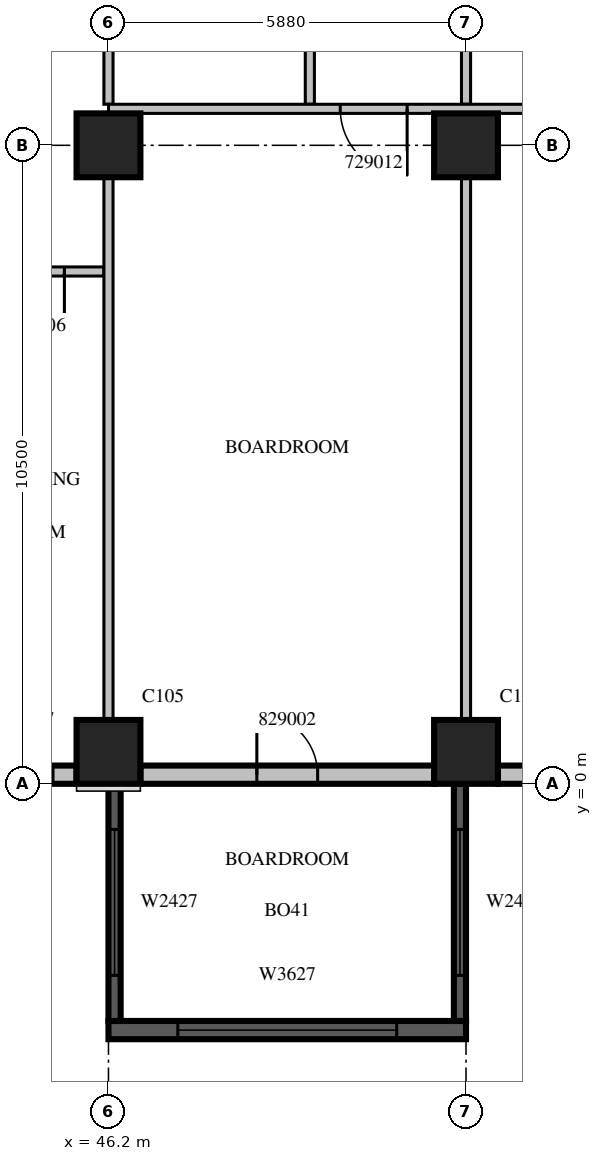
"""IFC4 building model, lengths in metres.
Left out: names, types, materials, properties, quantities, classifications, styles, units other than length and angle.
Written with IfcOpenShell. Run it as: python <this file> out.ifc"""

import sys

from ifc_helpers import new_model, si_unit, direction, frame, frame_2d, origin, origin_2d, place, context, subcontext, project, spatial, rectangle, extrude, source, transform, mapped, element, fill, save


model = new_model("IFC4")
c1 = context("Model", 3, precision=1e-05, world=origin(), true_north=direction((0.0, 1.0)))
c2 = subcontext(c1, "Body", "Model", "MODEL_VIEW")
j1 = project(units=[si_unit("LENGTHUNIT", "METRE"), si_unit("PLANEANGLEUNIT", "RADIAN")], contexts=[c1])
p1 = place(None, origin())
s1 = spatial("IfcSite", under=j1, at=p1, CompositionType="ELEMENT")
p2 = place(p1, origin())
s2 = spatial("IfcBuilding", under=s1, at=p2, CompositionType="ELEMENT")
p3 = place(p2, frame((0.0, 0.0, 132.9)))
s3 = spatial("IfcBuildingStorey", under=s2, at=p3, CompositionType="ELEMENT", Elevation=132.9)
m1 = source(origin(), c2, "Body", "SweptSolid", [
    extrude(rectangle(XDim=1.05, YDim=1.05, at=origin_2d()), origin(), (0.0, 0.0, 1.0), 4.2),
])
for number, where, z_axis, x_axis in (
    (1, (46.2, 0.525, 0.0), (0.0, 0.0, 1.0), (1.0, 0.0, 0.0)),
    (2, (52.08, 0.525, 0.0), (0.0, 0.0, 1.0), (1.0, 0.0, 0.0)),
    (3, (46.2, 10.5, 0.0), (0.0, 0.0, 1.0), (1.0, 0.0, 0.0)),
    (4, (52.08, 10.5, 0.0), (0.0, 0.0, 1.0), (1.0, 0.0, 0.0)),
):
    element("IfcColumn", number, at=place(p3, frame(where, z_axis=z_axis, x_axis=x_axis)), inside=s3, PredefinedType="COLUMN", context=c2, shape_type="MappedRepresentation", body=[
        mapped(m1, transform((0.0, 0.0, 0.0), scale=1.0)),
    ])
m2 = source(origin(), c2, "Body", "SweptSolid", [
    extrude(rectangle(XDim=1.675, YDim=0.3, at=frame_2d((0.838, 0.0))), origin(), (0.0, 0.0, 1.0), 3.8),
])
p4 = place(p3, frame((44.0, 0.15, 0.0), z_axis=(0.0, 0.0, 1.0), x_axis=(1.0, 0.0, 0.0)))
e5 = element("IfcWall", 5, at=p4, inside=s3, PredefinedType="STANDARD", context=c2, shape_type="MappedRepresentation", body=[
    mapped(m2, transform((0.0, 0.0, 0.0), scale=1.0)),
])
m3 = source(origin(), c2, "Body", "SweptSolid", [
    extrude(rectangle(XDim=0.9, YDim=2.7, at=frame_2d((0.45, 1.35))), frame((0.0, 0.16, 0.0), z_axis=(0.0, -1.0, 0.0), x_axis=(1.0, 0.0, 0.0)), (0.0, 0.0, 1.0), 0.32),
])
p5 = place(p4, frame((0.388, 0.0, 0.6)))
e6 = element("IfcOpeningElement", 6, at=p5, cuts=e5, PredefinedType="OPENING", context=c2, shape_type="MappedRepresentation", body=[
    mapped(m3, transform((0.0, 0.0, 0.0), scale=1.0)),
])
m4 = source(origin(), c2, "Body", "SweptSolid", [
    extrude(rectangle(XDim=4.83, YDim=0.3, at=frame_2d((2.415, 0.0))), origin(), (0.0, 0.0, 1.0), 3.8),
])
p6 = place(p3, frame((46.725, 0.15, 0.0), z_axis=(0.0, 0.0, 1.0), x_axis=(1.0, 0.0, 0.0)))
e7 = element("IfcWall", 7, at=p6, inside=s3, PredefinedType="STANDARD", context=c2, shape_type="MappedRepresentation", body=[
    mapped(m4, transform((0.0, 0.0, 0.0), scale=1.0)),
])
m5 = source(origin(), c2, "Body", "SweptSolid", [
    extrude(rectangle(XDim=1.0, YDim=2.1, at=frame_2d((0.5, 1.05))), frame((0.0, 0.16, 0.0), z_axis=(0.0, -1.0, 0.0), x_axis=(1.0, 0.0, 0.0)), (0.0, 0.0, 1.0), 0.32),
])
p7 = place(p6, frame((1.915, 0.0, 0.0)))
e8 = element("IfcOpeningElement", 8, at=p7, cuts=e7, PredefinedType="OPENING", context=c2, shape_type="MappedRepresentation", body=[
    mapped(m5, transform((0.0, 0.0, 0.0), scale=1.0)),
])
p8 = place(p3, frame((52.605, 0.15, 0.0), z_axis=(0.0, 0.0, 1.0), x_axis=(1.0, 0.0, 0.0)))
e9 = element("IfcWall", 9, at=p8, inside=s3, PredefinedType="STANDARD", context=c2, shape_type="MappedRepresentation", body=[
    mapped(m4, transform((0.0, 0.0, 0.0), scale=1.0)),
])
m6 = source(origin(), c2, "Body", "SweptSolid", [
    extrude(rectangle(XDim=3.6, YDim=2.7, at=frame_2d((1.8, 1.35))), frame((0.0, 0.16, 0.0), z_axis=(0.0, -1.0, 0.0), x_axis=(1.0, 0.0, 0.0)), (0.0, 0.0, 1.0), 0.32),
])
p9 = place(p8, frame((0.615, 0.0, 0.6)))
e10 = element("IfcOpeningElement", 10, at=p9, cuts=e9, PredefinedType="OPENING", context=c2, shape_type="MappedRepresentation", body=[
    mapped(m6, transform((0.0, 0.0, 0.0), scale=1.0)),
])
m7 = source(origin(), c2, "Body", "SweptSolid", [
    extrude(rectangle(XDim=5.88, YDim=0.3, at=frame_2d((2.94, 0.0))), origin(), (0.0, 0.0, 1.0), 3.79),
])
p10 = place(p3, frame((46.2, -4.05, 0.0), z_axis=(0.0, 0.0, 1.0), x_axis=(1.0, 0.0, 0.0)))
e11 = element("IfcWall", 11, at=p10, inside=s3, PredefinedType="SOLIDWALL", context=c2, shape_type="MappedRepresentation", body=[
    mapped(m7, transform((0.0, 0.0, 0.0), scale=1.0)),
])
p11 = place(p10, frame((1.14, 0.0, 0.6)))
e12 = element("IfcOpeningElement", 12, at=p11, cuts=e11, PredefinedType="OPENING", context=c2, shape_type="MappedRepresentation", body=[
    mapped(m6, transform((0.0, 0.0, 0.0), scale=1.0)),
])
m8 = source(origin(), c2, "Body", "SweptSolid", [
    extrude(rectangle(XDim=3.9, YDim=0.2, at=frame_2d((1.95, 0.0))), origin(), (0.0, 0.0, 1.0), 3.79),
])
p12 = place(p3, frame((46.3, 0.0, 0.0), z_axis=(0.0, 0.0, 1.0), x_axis=(0.0, -1.0, 0.0)))
e13 = element("IfcWall", 13, at=p12, inside=s3, PredefinedType="SOLIDWALL", context=c2, shape_type="MappedRepresentation", body=[
    mapped(m8, transform((0.0, 0.0, 0.0), scale=1.0)),
])
m9 = source(origin(), c2, "Body", "SweptSolid", [
    extrude(rectangle(XDim=2.4, YDim=2.7, at=frame_2d((1.2, 1.35))), frame((0.0, 0.11, 0.0), z_axis=(0.0, -1.0, 0.0), x_axis=(1.0, 0.0, 0.0)), (0.0, 0.0, 1.0), 0.22),
])
p13 = place(p12, frame((0.75, 0.0, 0.6)))
e14 = element("IfcOpeningElement", 14, at=p13, cuts=e13, PredefinedType="OPENING", context=c2, shape_type="MappedRepresentation", body=[
    mapped(m9, transform((0.0, 0.0, 0.0), scale=1.0)),
])
p14 = place(p3, frame((51.98, 0.0, 0.0), z_axis=(0.0, 0.0, 1.0), x_axis=(0.0, -1.0, 0.0)))
e15 = element("IfcWall", 15, at=p14, inside=s3, PredefinedType="SOLIDWALL", context=c2, shape_type="MappedRepresentation", body=[
    mapped(m8, transform((0.0, 0.0, 0.0), scale=1.0)),
])
p15 = place(p14, frame((0.75, 0.0, 0.6)))
e16 = element("IfcOpeningElement", 16, at=p15, cuts=e15, PredefinedType="OPENING", context=c2, shape_type="MappedRepresentation", body=[
    mapped(m9, transform((0.0, 0.0, 0.0), scale=1.0)),
])
m10 = source(origin(), c2, "Body", "SweptSolid", [
    extrude(rectangle(XDim=2.2, YDim=0.15, at=frame_2d((1.1, 0.0))), origin(), (0.0, 0.0, 1.0), 3.8),
])
p16 = place(p3, frame((46.125, 8.425, 0.0), z_axis=(0.0, 0.0, 1.0), x_axis=(-1.0, 0.0, 0.0)))
e17 = element("IfcWall", 17, at=p16, inside=s3, PredefinedType="PARTITIONING", context=c2, shape_type="MappedRepresentation", body=[
    mapped(m10, transform((0.0, 0.0, 0.0), scale=1.0)),
])
m11 = source(origin(), c2, "Body", "SweptSolid", [
    extrude(rectangle(XDim=0.9, YDim=2.1, at=frame_2d((0.45, 1.05))), frame((0.0, 0.085, 0.0), z_axis=(0.0, -1.0, 0.0), x_axis=(1.0, 0.0, 0.0)), (0.0, 0.0, 1.0), 0.17),
])
p17 = place(p16, frame((0.65, 0.0, 0.0)))
e18 = element("IfcOpeningElement", 18, at=p17, cuts=e17, PredefinedType="OPENING", context=c2, shape_type="MappedRepresentation", body=[
    mapped(m11, transform((0.0, 0.0, 0.0), scale=1.0)),
])
m12 = source(origin(), c2, "Body", "SweptSolid", [
    extrude(rectangle(XDim=3.525, YDim=0.15, at=frame_2d((1.762, 0.0))), origin(), (0.0, 0.0, 1.0), 3.8),
])
p18 = place(p3, frame((49.512, 11.175, 0.0), z_axis=(0.0, 0.0, 1.0), x_axis=(0.0, 1.0, 0.0)))
e19 = element("IfcWall", 19, at=p18, inside=s3, PredefinedType="PARTITIONING", context=c2, shape_type="MappedRepresentation", body=[
    mapped(m12, transform((0.0, 0.0, 0.0), scale=1.0)),
])
m13 = source(origin(), c2, "Body", "SweptSolid", [
    extrude(rectangle(XDim=8.927, YDim=0.15, at=frame_2d((4.463, 0.0))), origin(), (0.0, 0.0, 1.0), 3.8),
])
p19 = place(p3, frame((46.2, 1.049, 0.0), z_axis=(0.0, 0.0, 1.0), x_axis=(0.0, 1.0, 0.0)))
e20 = element("IfcWall", 20, at=p19, inside=s3, PredefinedType="PARTITIONING", context=c2, shape_type="MappedRepresentation", body=[
    mapped(m13, transform((0.0, 0.0, 0.0), scale=1.0)),
])
p20 = place(p3, frame((46.2, 11.175, 0.0), z_axis=(0.0, 0.0, 1.0), x_axis=(0.0, 1.0, 0.0)))
e21 = element("IfcWall", 21, at=p20, inside=s3, PredefinedType="PARTITIONING", context=c2, shape_type="MappedRepresentation", body=[
    mapped(m12, transform((0.0, 0.0, 0.0), scale=1.0)),
])
p21 = place(p3, frame((52.08, 1.049, 0.0), z_axis=(0.0, 0.0, 1.0), x_axis=(0.0, 1.0, 0.0)))
e22 = element("IfcWall", 22, at=p21, inside=s3, PredefinedType="PARTITIONING", context=c2, shape_type="MappedRepresentation", body=[
    mapped(m13, transform((0.0, 0.0, 0.0), scale=1.0)),
])
p22 = place(p3, frame((52.08, 11.175, 0.0), z_axis=(0.0, 0.0, 1.0), x_axis=(0.0, 1.0, 0.0)))
e23 = element("IfcWall", 23, at=p22, inside=s3, PredefinedType="PARTITIONING", context=c2, shape_type="MappedRepresentation", body=[
    mapped(m12, transform((0.0, 0.0, 0.0), scale=1.0)),
])
m14 = source(origin(), c2, "Body", "SweptSolid", [
    extrude(rectangle(XDim=24.9, YDim=0.15, at=frame_2d((12.45, 0.0))), origin(), (0.0, 0.0, 1.0), 3.8),
])
p23 = place(p3, frame((71.1, 11.1, 0.0), z_axis=(0.0, 0.0, 1.0), x_axis=(-1.0, 0.0, 0.0)))
e24 = element("IfcWall", 24, at=p23, inside=s3, PredefinedType="PARTITIONING", context=c2, shape_type="MappedRepresentation", body=[
    mapped(m14, transform((0.0, 0.0, 0.0), scale=1.0)),
])
m15 = source(origin(), c2, "Body", "SweptSolid", [
    extrude(rectangle(XDim=1.1, YDim=2.1, at=frame_2d((0.55, 1.05))), frame((0.0, 0.085, 0.0), z_axis=(0.0, -1.0, 0.0), x_axis=(1.0, 0.0, 0.0)), (0.0, 0.0, 1.0), 0.17),
])
p24 = place(p23, frame((19.988, 0.0, 0.0)))
e25 = element("IfcOpeningElement", 25, at=p24, cuts=e24, PredefinedType="OPENING", context=c2, shape_type="MappedRepresentation", body=[
    mapped(m15, transform((0.0, 0.0, 0.0), scale=1.0)),
])
p25 = place(p23, frame((16.497, 0.0, 0.0)))
e26 = element("IfcOpeningElement", 26, at=p25, cuts=e24, PredefinedType="OPENING", context=c2, shape_type="MappedRepresentation", body=[
    mapped(m15, transform((0.0, 0.0, 0.0), scale=1.0)),
])
p26 = place(p23, frame((2.028, 0.0, 0.0)))
e27 = element("IfcOpeningElement", 27, at=p26, cuts=e24, PredefinedType="OPENING", context=c2, shape_type="MappedRepresentation", body=[
    mapped(m11, transform((0.0, 0.0, 0.0), scale=1.0)),
])
m16 = source(origin(), c2, "Body", "SweptSolid", [
    extrude(rectangle(XDim=0.9, YDim=2.7, at=frame_2d((0.45, 1.35))), frame((0.0, 0.03, 0.0), z_axis=(0.0, -1.0, 0.0), x_axis=(1.0, 0.0, 0.0)), (0.0, 0.0, 1.0), 0.06),
])
p27 = place(p5, origin())
e28 = element("IfcWindow", 28, at=p27, inside=s3, PartitioningType="SINGLE_PANEL", PredefinedType="WINDOW", context=c2, shape_type="MappedRepresentation", body=[
    mapped(m16, transform((0.0, 0.0, 0.0), scale=1.0)),
])
fill(e6, e28)
m17 = source(origin(), c2, "Body", "SweptSolid", [
    extrude(rectangle(XDim=3.6, YDim=2.7, at=frame_2d((1.8, 1.35))), frame((0.0, 0.03, 0.0), z_axis=(0.0, -1.0, 0.0), x_axis=(1.0, 0.0, 0.0)), (0.0, 0.0, 1.0), 0.06),
])
p28 = place(p11, origin())
e29 = element("IfcWindow", 29, at=p28, inside=s3, PartitioningType="SINGLE_PANEL", PredefinedType="WINDOW", context=c2, shape_type="MappedRepresentation", body=[
    mapped(m17, transform((0.0, 0.0, 0.0), scale=1.0)),
])
fill(e12, e29)
m18 = source(origin(), c2, "Body", "SweptSolid", [
    extrude(rectangle(XDim=2.4, YDim=2.7, at=frame_2d((1.2, 1.35))), frame((0.0, 0.03, 0.0), z_axis=(0.0, -1.0, 0.0), x_axis=(1.0, 0.0, 0.0)), (0.0, 0.0, 1.0), 0.06),
])
p29 = place(p13, origin())
e30 = element("IfcWindow", 30, at=p29, inside=s3, PartitioningType="SINGLE_PANEL", PredefinedType="WINDOW", context=c2, shape_type="MappedRepresentation", body=[
    mapped(m18, transform((0.0, 0.0, 0.0), scale=1.0)),
])
fill(e14, e30)
p30 = place(p15, origin())
e31 = element("IfcWindow", 31, at=p30, inside=s3, PartitioningType="SINGLE_PANEL", PredefinedType="WINDOW", context=c2, shape_type="MappedRepresentation", body=[
    mapped(m18, transform((0.0, 0.0, 0.0), scale=1.0)),
])
fill(e16, e31)
m19 = source(origin(), c2, "Body", "SweptSolid", [
    extrude(rectangle(XDim=0.9, YDim=2.1, at=frame_2d((0.45, 1.05))), frame((0.0, 0.025, 0.0), z_axis=(0.0, -1.0, 0.0), x_axis=(1.0, 0.0, 0.0)), (0.0, 0.0, 1.0), 0.05),
])
p31 = place(p17, origin())
e32 = element("IfcDoor", 32, at=p31, inside=s3, OperationType="SINGLE_SWING_LEFT", PredefinedType="DOOR", context=c2, shape_type="MappedRepresentation", body=[
    mapped(m19, transform((0.0, 0.0, 0.0), scale=1.0)),
])
fill(e18, e32)
m20 = source(origin(), c2, "Body", "SweptSolid", [
    extrude(rectangle(XDim=1.1, YDim=2.1, at=frame_2d((0.55, 1.05))), frame((0.0, 0.025, 0.0), z_axis=(0.0, -1.0, 0.0), x_axis=(1.0, 0.0, 0.0)), (0.0, 0.0, 1.0), 0.05),
])
p32 = place(p24, origin())
e33 = element("IfcDoor", 33, at=p32, inside=s3, OperationType="SINGLE_SWING_LEFT", PredefinedType="DOOR", context=c2, shape_type="MappedRepresentation", body=[
    mapped(m20, transform((0.0, 0.0, 0.0), scale=1.0)),
])
fill(e25, e33)
m21 = source(origin(), c2, "Body", "SweptSolid", [
    extrude(rectangle(XDim=1.0, YDim=2.1, at=frame_2d((0.5, 1.05))), frame((0.0, 0.025, 0.0), z_axis=(0.0, -1.0, 0.0), x_axis=(1.0, 0.0, 0.0)), (0.0, 0.0, 1.0), 0.05),
])
p33 = place(p7, origin())
e34 = element("IfcDoor", 34, at=p33, inside=s3, OperationType="SINGLE_SWING_LEFT", PredefinedType="DOOR", context=c2, shape_type="MappedRepresentation", body=[
    mapped(m21, transform((0.0, 0.0, 0.0), scale=1.0)),
])
fill(e8, e34)
save(model, sys.argv[1])
